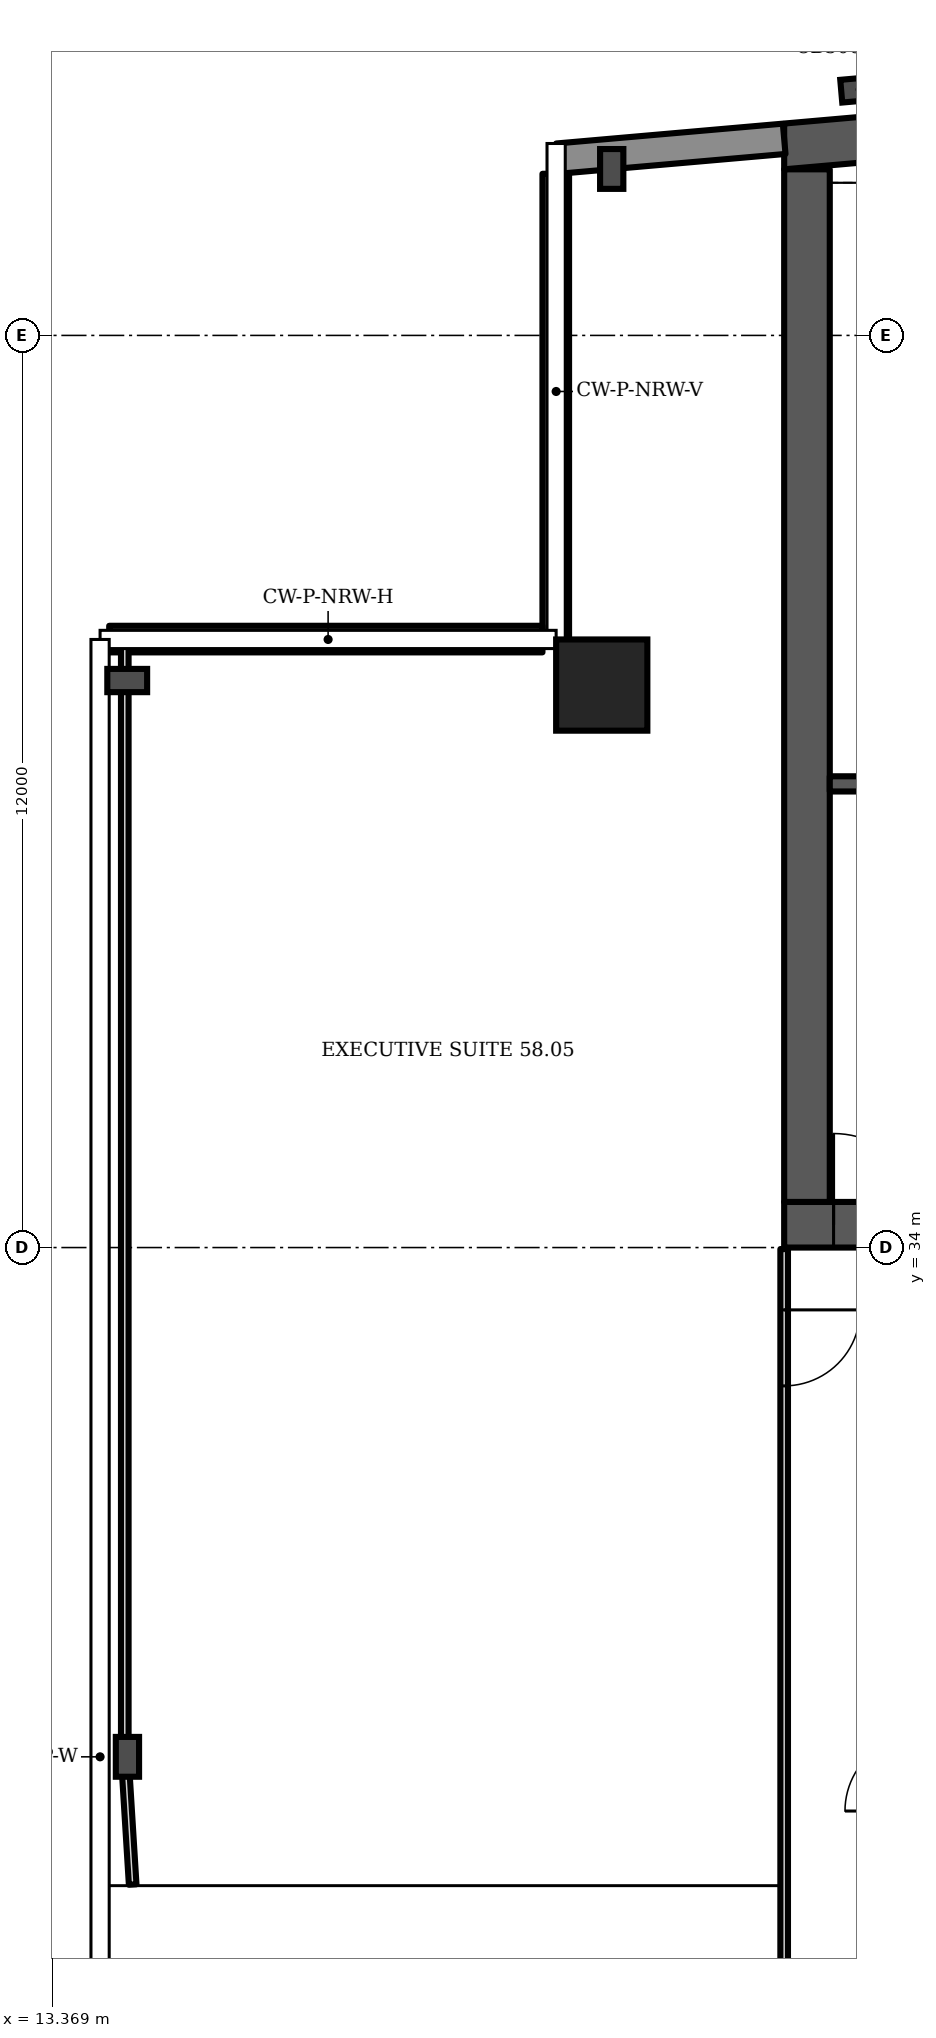
"""IFC4 building model, lengths in metres.
Left out: names, types, materials, properties, quantities, classifications, styles, units other than length and angle.
Written with IfcOpenShell. Run it as: python <this file> out.ifc"""

import sys

from ifc_helpers import new_model, si_unit, direction, frame, frame_2d, origin, origin_2d, place, context, subcontext, project, spatial, polyline, rectangle, i_section, outline, extrude, element, fill, save


model = new_model("IFC4")
c1 = context("Model", 3, precision=1e-05, world=origin(), true_north=direction((0.0, 1.0)))
c2 = subcontext(c1, "Body", "Model", "MODEL_VIEW")
j1 = project(units=[si_unit("LENGTHUNIT", "METRE"), si_unit("PLANEANGLEUNIT", "RADIAN")], contexts=[c1])
p1 = place(None, origin())
s1 = spatial("IfcSite", under=j1, at=p1, CompositionType="ELEMENT")
p2 = place(p1, origin())
s2 = spatial("IfcBuilding", under=s1, at=p2, CompositionType="ELEMENT")
p3 = place(p2, frame((0.0, 0.0, 232.3)))
s3 = spatial("IfcBuildingStorey", under=s2, at=p3, CompositionType="ELEMENT", Elevation=232.3)
p4 = place(p3, frame((0.0, 0.0, -0.0)))
e1 = element("IfcWall", 1, at=p4, inside=s3, PredefinedType="SHEAR", context=c2, shape_type="SweptSolid", body=[
    extrude(outline(polyline([(23.0, 48.185), (40.5, 49.716), (58.0, 48.185), (58.0, 48.787), (40.5, 50.318), (23.0, 48.787), (23.0, 48.185)])), origin(), (0.0, 0.0, 1.0), 3.6),
])
p5 = place(p3, frame((23.0, 34.3, 0.0), z_axis=(0.0, 0.0, 1.0), x_axis=(1.0, 0.0, 0.0)))
e2 = element("IfcWall", 2, at=p5, inside=s3, PredefinedType="SHEAR", context=c2, shape_type="SweptSolid", body=[
    extrude(rectangle(XDim=35.0, YDim=0.6, at=frame_2d((17.5, 0.0))), origin(), (0.0, 0.0, 1.0), 3.6),
])
p6 = place(p5, frame((0.65, 0.0, 0.0)))
e3 = element("IfcOpeningElement", 3, at=p6, cuts=e2, PredefinedType="OPENING", context=c2, shape_type="SweptSolid", body=[
    extrude(rectangle(XDim=1.2, YDim=2.1, at=frame_2d((0.6, 1.05))), frame((0.0, 0.31, 0.0), z_axis=(0.0, -1.0, 0.0), x_axis=(1.0, 0.0, 0.0)), (0.0, 0.0, 1.0), 0.62),
])
p7 = place(p5, frame((7.717, 0.0, 0.0)))
e4 = element("IfcOpeningElement", 4, at=p7, cuts=e2, PredefinedType="OPENING", context=c2, shape_type="SweptSolid", body=[
    extrude(rectangle(XDim=1.1, YDim=2.1, at=frame_2d((0.55, 1.05))), frame((0.0, 0.31, 0.0), z_axis=(0.0, -1.0, 0.0), x_axis=(1.0, 0.0, 0.0)), (0.0, 0.0, 1.0), 0.62),
])
p8 = place(p5, frame((12.183, 0.0, 0.0)))
e5 = element("IfcOpeningElement", 5, at=p8, cuts=e2, PredefinedType="OPENING", context=c2, shape_type="SweptSolid", body=[
    extrude(rectangle(XDim=1.1, YDim=2.1, at=frame_2d((0.55, 1.05))), frame((0.0, 0.31, 0.0), z_axis=(0.0, -1.0, 0.0), x_axis=(1.0, 0.0, 0.0)), (0.0, 0.0, 1.0), 0.62),
])
p9 = place(p5, frame((9.8, 0.0, 0.0)))
e6 = element("IfcOpeningElement", 6, at=p9, cuts=e2, PredefinedType="OPENING", context=c2, shape_type="SweptSolid", body=[
    extrude(rectangle(XDim=1.4, YDim=2.1, at=frame_2d((0.7, 1.05))), frame((0.0, 0.31, 0.0), z_axis=(0.0, -1.0, 0.0), x_axis=(1.0, 0.0, 0.0)), (0.0, 0.0, 1.0), 0.62),
])
p10 = place(p5, frame((14.717, 0.0, 0.0)))
e7 = element("IfcOpeningElement", 7, at=p10, cuts=e2, PredefinedType="OPENING", context=c2, shape_type="SweptSolid", body=[
    extrude(rectangle(XDim=1.1, YDim=2.1, at=frame_2d((0.55, 1.05))), frame((0.0, 0.31, 0.0), z_axis=(0.0, -1.0, 0.0), x_axis=(1.0, 0.0, 0.0)), (0.0, 0.0, 1.0), 0.62),
])
p11 = place(p5, frame((16.95, 0.0, 0.0)))
e8 = element("IfcOpeningElement", 8, at=p11, cuts=e2, PredefinedType="OPENING", context=c2, shape_type="SweptSolid", body=[
    extrude(rectangle(XDim=1.1, YDim=2.1, at=frame_2d((0.55, 1.05))), frame((0.0, 0.31, 0.0), z_axis=(0.0, -1.0, 0.0), x_axis=(1.0, 0.0, 0.0)), (0.0, 0.0, 1.0), 0.62),
])
p12 = place(p5, frame((19.183, 0.0, 0.0)))
e9 = element("IfcOpeningElement", 9, at=p12, cuts=e2, PredefinedType="OPENING", context=c2, shape_type="SweptSolid", body=[
    extrude(rectangle(XDim=1.1, YDim=2.1, at=frame_2d((0.55, 1.05))), frame((0.0, 0.31, 0.0), z_axis=(0.0, -1.0, 0.0), x_axis=(1.0, 0.0, 0.0)), (0.0, 0.0, 1.0), 0.62),
])
p13 = place(p5, frame((26.15, 0.0, 0.0)))
e10 = element("IfcOpeningElement", 10, at=p13, cuts=e2, PredefinedType="OPENING", context=c2, shape_type="SweptSolid", body=[
    extrude(rectangle(XDim=1.2, YDim=2.1, at=frame_2d((0.6, 1.05))), frame((0.0, 0.31, 0.0), z_axis=(0.0, -1.0, 0.0), x_axis=(1.0, 0.0, 0.0)), (0.0, 0.0, 1.0), 0.62),
])
p14 = place(p5, frame((28.767, 0.0, 0.0)))
e11 = element("IfcOpeningElement", 11, at=p14, cuts=e2, PredefinedType="OPENING", context=c2, shape_type="SweptSolid", body=[
    extrude(rectangle(XDim=1.0, YDim=2.1, at=frame_2d((0.5, 1.05))), frame((0.0, 0.31, 0.0), z_axis=(0.0, -1.0, 0.0), x_axis=(1.0, 0.0, 0.0)), (0.0, 0.0, 1.0), 0.62),
])
p15 = place(p5, frame((33.083, 0.0, 0.0)))
e12 = element("IfcOpeningElement", 12, at=p15, cuts=e2, PredefinedType="OPENING", context=c2, shape_type="SweptSolid", body=[
    extrude(rectangle(XDim=1.0, YDim=2.1, at=frame_2d((0.5, 1.05))), frame((0.0, 0.31, 0.0), z_axis=(0.0, -1.0, 0.0), x_axis=(1.0, 0.0, 0.0)), (0.0, 0.0, 1.0), 0.62),
])
p16 = place(p5, frame((30.8, 0.0, 0.0)))
e13 = element("IfcOpeningElement", 13, at=p16, cuts=e2, PredefinedType="OPENING", context=c2, shape_type="SweptSolid", body=[
    extrude(rectangle(XDim=1.4, YDim=2.1, at=frame_2d((0.7, 1.05))), frame((0.0, 0.31, 0.0), z_axis=(0.0, -1.0, 0.0), x_axis=(1.0, 0.0, 0.0)), (0.0, 0.0, 1.0), 0.62),
])
p17 = place(p3, frame((23.3, 34.6, 0.0), z_axis=(0.0, 0.0, 1.0), x_axis=(0.0, 1.0, 0.0)))
e14 = element("IfcWall", 14, at=p17, inside=s3, PredefinedType="SHEAR", context=c2, shape_type="SweptSolid", body=[
    extrude(rectangle(XDim=13.585, YDim=0.6, at=frame_2d((6.792, 0.0))), origin(), (0.0, 0.0, 1.0), 3.6),
])
p18 = place(p3, frame((20.6, 41.4, 0.0), z_axis=(0.0, 0.0, 1.0), x_axis=(1.0, 0.0, 0.0)))
e15 = element("IfcColumn", 15, at=p18, inside=s3, PredefinedType="COLUMN", context=c2, shape_type="SweptSolid", body=[
    extrude(rectangle(XDim=1.2, YDim=1.2, at=origin_2d()), origin(), (0.0, 0.0, 1.0), 3.6),
])
for number, where, z_axis, x_axis in (
    (16, (20.731, 48.19, 0.0), (0.0, 0.0, 1.0), (-1.0, 0.0, 0.0)),
    (17, (14.357, 41.46, 0.0), (0.0, 0.0, 1.0), (0.0, 1.0, 0.0)),
    (18, (14.36, 27.3, 0.0), (0.0, 0.0, 1.0), (-1.0, 0.0, 0.0)),
):
    element("IfcColumn", number, at=place(p3, frame(where, z_axis=z_axis, x_axis=x_axis)), inside=s3, PredefinedType="COLUMN", context=c2, shape_type="SweptSolid", body=[
        extrude(i_section(OverallWidth=0.306, OverallDepth=0.524, WebThickness=0.021, FlangeThickness=0.04, FilletRadius=0.027, at=origin_2d()), origin(), (0.0, 0.0, 1.0), 3.6),
    ])
p19 = place(p3, frame((24.0, 49.235, 0.0), z_axis=(0.0, 0.0, 1.0), x_axis=(-0.087156, 0.996197, 0.0)))
e19 = element("IfcColumn", 19, at=p19, inside=s3, PredefinedType="COLUMN", context=c2, shape_type="SweptSolid", body=[
    extrude(i_section(OverallWidth=0.3, OverallDepth=0.5, WebThickness=0.014, FlangeThickness=0.028, FilletRadius=0.027, at=origin_2d()), origin(), (0.0, 0.0, 1.0), 3.6),
])
p20 = place(p3, frame((23.0, 48.587, 0.0), z_axis=(0.0, 0.0, 1.0), x_axis=(-0.996194, -0.087168, 0.0)))
e20 = element("IfcWall", 20, at=p20, inside=s3, PredefinedType="SOLIDWALL", context=c2, shape_type="SweptSolid", body=[
    extrude(rectangle(XDim=2.994, YDim=0.4, at=frame_2d((1.497, 0.0))), origin(), (0.0, 0.0, 1.0), 3.2),
])
p21 = place(p3, frame((19.995, 48.126, 0.0), z_axis=(0.0, 0.0, 1.0), x_axis=(0.0, -1.0, 0.0)))
e21 = element("IfcWall", 21, at=p21, inside=s3, PredefinedType="SOLIDWALL", context=c2, shape_type="SweptSolid", body=[
    extrude(rectangle(XDim=6.126, YDim=0.35, at=frame_2d((3.063, 0.0))), origin(), (0.0, 0.0, 1.0), 1.0),
])
p22 = place(p3, frame((19.82, 42.005, 0.0), z_axis=(0.0, 0.0, 1.0), x_axis=(-1.0, 0.0, 0.0)))
e22 = element("IfcWall", 22, at=p22, inside=s3, PredefinedType="SOLIDWALL", context=c2, shape_type="SweptSolid", body=[
    extrude(rectangle(XDim=5.7, YDim=0.35, at=frame_2d((2.85, 0.0))), origin(), (0.0, 0.0, 1.0), 1.0),
])
p23 = place(p3, frame((23.6, 40.1, 0.0), z_axis=(0.0, 0.0, 1.0), x_axis=(1.0, 0.0, 0.0)))
e23 = element("IfcWall", 23, at=p23, inside=s3, PredefinedType="SHEAR", context=c2, shape_type="SweptSolid", body=[
    extrude(rectangle(XDim=6.1, YDim=0.2, at=frame_2d((3.05, 0.0))), origin(), (0.0, 0.0, 1.0), 3.2),
])
p24 = place(p23, frame((3.325, 0.0, 0.0)))
e24 = element("IfcOpeningElement", 24, at=p24, cuts=e23, PredefinedType="OPENING", context=c2, shape_type="SweptSolid", body=[
    extrude(rectangle(XDim=1.2, YDim=2.1, at=frame_2d((0.6, 1.05))), frame((0.0, 0.11, 0.0), z_axis=(0.0, -1.0, 0.0), x_axis=(1.0, 0.0, 0.0)), (0.0, 0.0, 1.0), 0.22),
])
p25 = place(p23, frame((0.475, 0.0, 0.0)))
e25 = element("IfcOpeningElement", 25, at=p25, cuts=e23, PredefinedType="OPENING", context=c2, shape_type="SweptSolid", body=[
    extrude(rectangle(XDim=0.9, YDim=2.1, at=frame_2d((0.45, 1.05))), frame((0.0, 0.11, 0.0), z_axis=(0.0, -1.0, 0.0), x_axis=(1.0, 0.0, 0.0)), (0.0, 0.0, 1.0), 0.22),
])
p26 = place(p3, frame((14.325, 27.3, 0.0), z_axis=(0.0, 0.0, 1.0), x_axis=(0.0, 1.0, 0.0)))
e26 = element("IfcWall", 26, at=p26, inside=s3, PredefinedType="PARTITIONING", context=c2, shape_type="SweptSolid", body=[
    extrude(rectangle(XDim=14.68, YDim=0.1, at=frame_2d((7.34, 0.0))), origin(), (0.0, 0.0, 1.0), 2.58),
])
p27 = place(p3, frame((14.429, 25.62, 0.0), z_axis=(0.0, 0.0, 1.0), x_axis=(-0.061647, 0.998101, 0.0)))
e27 = element("IfcWall", 27, at=p27, inside=s3, PredefinedType="PARTITIONING", context=c2, shape_type="SweptSolid", body=[
    extrude(rectangle(XDim=1.683, YDim=0.1, at=frame_2d((0.842, 0.0))), origin(), (0.0, 0.0, 1.0), 3.2),
])
p28 = place(p3, frame((23.0, 24.275, 0.0), z_axis=(0.0, 0.0, 1.0), x_axis=(0.0, 1.0, 0.0)))
e28 = element("IfcWall", 28, at=p28, inside=s3, PredefinedType="PARTITIONING", context=c2, shape_type="SweptSolid", body=[
    extrude(rectangle(XDim=9.705, YDim=0.1, at=frame_2d((4.853, 0.0))), origin(), (0.0, 0.0, 1.0), 3.2),
])
p29 = place(p28, frame((7.905, 0.0, 0.0)))
e29 = element("IfcOpeningElement", 29, at=p29, cuts=e28, PredefinedType="OPENING", context=c2, shape_type="SweptSolid", body=[
    extrude(rectangle(XDim=1.0, YDim=2.1, at=frame_2d((0.5, 1.05))), frame((0.0, 0.06, 0.0), z_axis=(0.0, -1.0, 0.0), x_axis=(1.0, 0.0, 0.0)), (0.0, 0.0, 1.0), 0.12),
])
p30 = place(p6, origin())
e30 = element("IfcDoor", 30, at=p30, inside=s3, OperationType="SINGLE_SWING_LEFT", PredefinedType="DOOR", context=c2, shape_type="SweptSolid", body=[
    extrude(rectangle(XDim=1.2, YDim=2.1, at=frame_2d((0.6, 1.05))), frame((0.0, 0.025, 0.0), z_axis=(0.0, -1.0, 0.0), x_axis=(1.0, 0.0, 0.0)), (0.0, 0.0, 1.0), 0.05),
])
fill(e3, e30)
p31 = place(p29, origin())
e31 = element("IfcDoor", 31, at=p31, inside=s3, OperationType="SINGLE_SWING_RIGHT", PredefinedType="DOOR", context=c2, shape_type="SweptSolid", body=[
    extrude(rectangle(XDim=1.0, YDim=2.1, at=frame_2d((0.5, 1.05))), frame((0.0, 0.025, 0.0), z_axis=(0.0, -1.0, 0.0), x_axis=(1.0, 0.0, 0.0)), (0.0, 0.0, 1.0), 0.05),
])
fill(e29, e31)
save(model, sys.argv[1])
